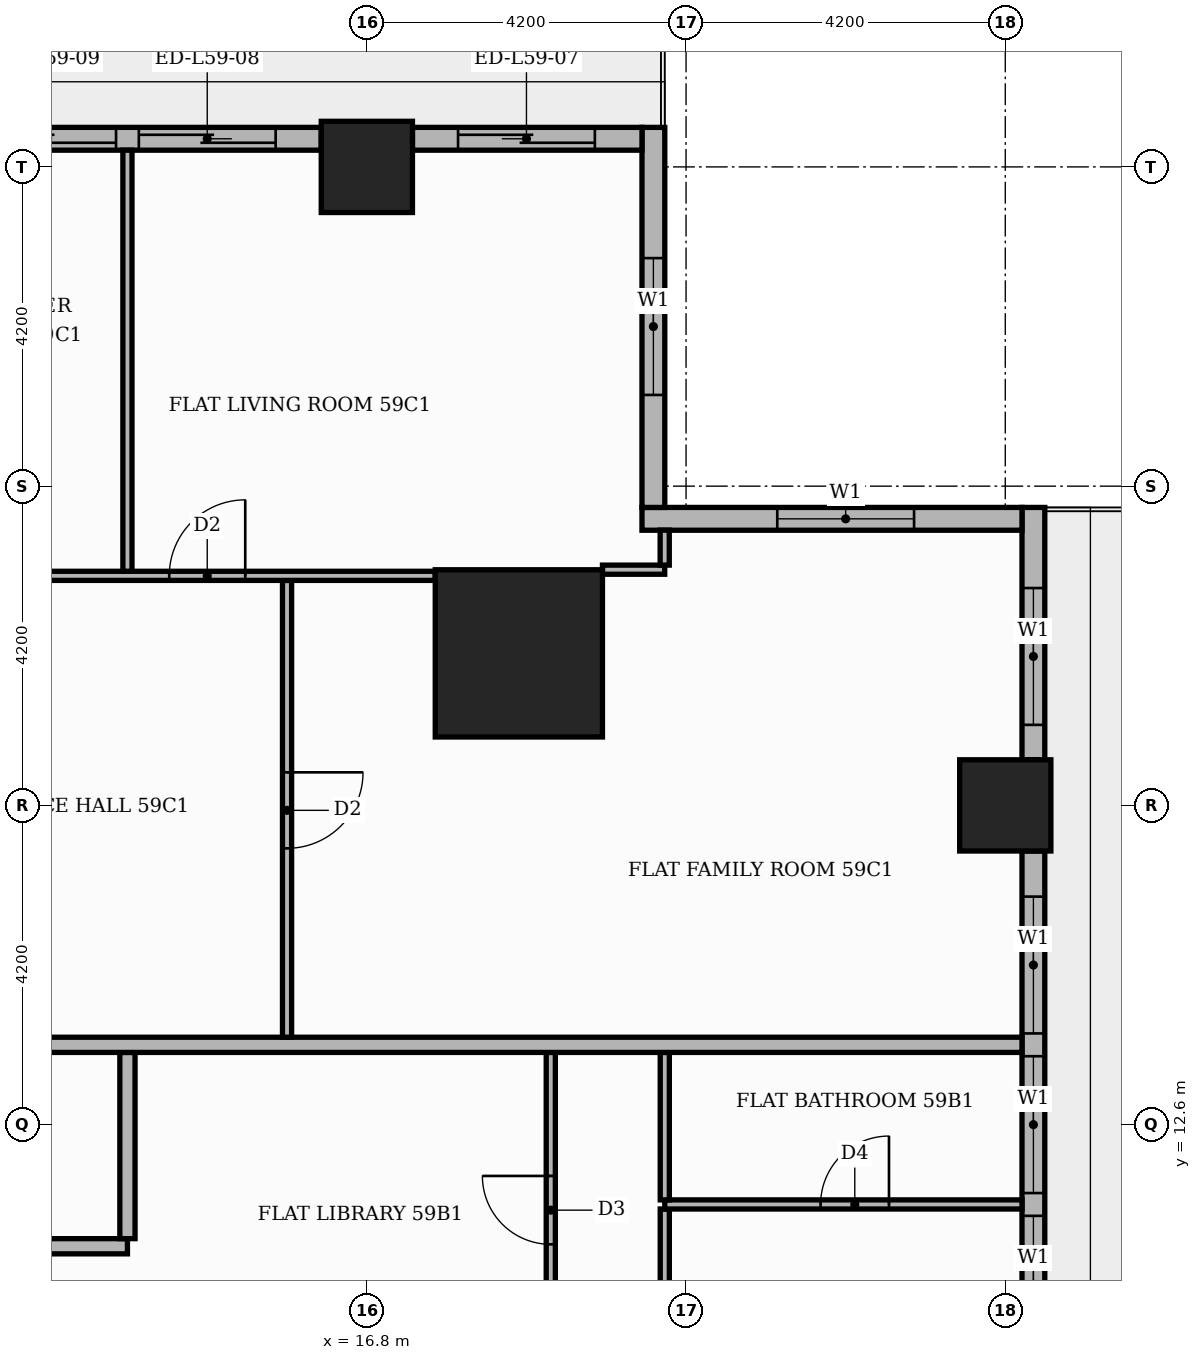
"""IFC4 building model, lengths in metres.
Left out: names, types, materials, properties, quantities, classifications, styles, units other than length and angle.
Written with IfcOpenShell. Run it as: python <this file> out.ifc"""

import sys

from ifc_helpers import new_model, si_unit, direction, frame, frame_2d, origin, origin_2d, place, context, subcontext, project, spatial, rectangle, extrude, element, fill, save


model = new_model("IFC4")
c1 = context("Model", 3, precision=1e-05, world=origin(), true_north=direction((0.0, 1.0)))
c2 = subcontext(c1, "Body", "Model", "MODEL_VIEW")
j1 = project(units=[si_unit("LENGTHUNIT", "METRE"), si_unit("PLANEANGLEUNIT", "RADIAN")], contexts=[c1])
p1 = place(None, origin())
s1 = spatial("IfcSite", under=j1, at=p1, CompositionType="ELEMENT")
p2 = place(p1, origin())
s2 = spatial("IfcBuilding", under=s1, at=p2, CompositionType="ELEMENT")
p3 = place(p2, frame((0.0, 0.0, 248.4)))
s3 = spatial("IfcBuildingStorey", under=s2, at=p3, CompositionType="ELEMENT", Elevation=248.4)
p4 = place(p3, frame((18.8, 18.8, 0.0), z_axis=(0.0, 0.0, 1.0), x_axis=(1.0, 0.0, 0.0)))
e1 = element("IfcColumn", 1, at=p4, inside=s3, PredefinedType="COLUMN", context=c2, shape_type="SweptSolid", body=[
    extrude(rectangle(XDim=2.2, YDim=2.2, at=origin_2d()), origin(), (0.0, 0.0, 1.0), 3.9),
])
for number, where, z_axis, x_axis in (
    (2, (25.2, 16.8, 0.0), (0.0, 0.0, 1.0), (1.0, 0.0, 0.0)),
    (3, (16.8, 25.2, 0.0), (0.0, 0.0, 1.0), (1.0, 0.0, 0.0)),
):
    element("IfcColumn", number, at=place(p3, frame(where, z_axis=z_axis, x_axis=x_axis)), inside=s3, PredefinedType="COLUMN", context=c2, shape_type="SweptSolid", body=[
        extrude(rectangle(XDim=1.2, YDim=1.2, at=origin_2d()), origin(), (0.0, 0.0, 1.0), 3.9),
    ])
p5 = place(p3, frame((25.57, 9.0, 0.0), z_axis=(0.0, 0.0, 1.0), x_axis=(0.0, 1.0, 0.0)))
e4 = element("IfcWall", 4, at=p5, inside=s3, PredefinedType="STANDARD", context=c2, shape_type="SweptSolid", body=[
    extrude(rectangle(XDim=7.2, YDim=0.3, at=frame_2d((3.6, 0.0))), origin(), (0.0, 0.0, 1.0), 3.48),
])
p6 = place(p5, frame((0.6, 0.0, 0.9)))
e5 = element("IfcOpeningElement", 5, at=p6, cuts=e4, PredefinedType="OPENING", context=c2, shape_type="SweptSolid", body=[
    extrude(rectangle(XDim=1.8, YDim=2.1, at=frame_2d((0.9, 1.05))), frame((0.0, 0.16, 0.0), z_axis=(0.0, -1.0, 0.0), x_axis=(1.0, 0.0, 0.0)), (0.0, 0.0, 1.0), 0.32),
])
p7 = place(p5, frame((2.7, 0.0, 0.9)))
e6 = element("IfcOpeningElement", 6, at=p7, cuts=e4, PredefinedType="OPENING", context=c2, shape_type="SweptSolid", body=[
    extrude(rectangle(XDim=1.8, YDim=2.1, at=frame_2d((0.9, 1.05))), frame((0.0, 0.16, 0.0), z_axis=(0.0, -1.0, 0.0), x_axis=(1.0, 0.0, 0.0)), (0.0, 0.0, 1.0), 0.32),
])
p8 = place(p5, frame((4.8, 0.0, 0.9)))
e7 = element("IfcOpeningElement", 7, at=p8, cuts=e4, PredefinedType="OPENING", context=c2, shape_type="SweptSolid", body=[
    extrude(rectangle(XDim=1.8, YDim=2.1, at=frame_2d((0.9, 1.05))), frame((0.0, 0.16, 0.0), z_axis=(0.0, -1.0, 0.0), x_axis=(1.0, 0.0, 0.0)), (0.0, 0.0, 1.0), 0.32),
])
p9 = place(p3, frame((25.57, 17.4, 0.0), z_axis=(0.0, 0.0, 1.0), x_axis=(0.0, 1.0, 0.0)))
e8 = element("IfcWall", 8, at=p9, inside=s3, PredefinedType="STANDARD", context=c2, shape_type="SweptSolid", body=[
    extrude(rectangle(XDim=3.32, YDim=0.3, at=frame_2d((1.66, 0.0))), origin(), (0.0, 0.0, 1.0), 3.48),
])
p10 = place(p9, frame((0.459, 0.0, 0.9)))
e9 = element("IfcOpeningElement", 9, at=p10, cuts=e8, PredefinedType="OPENING", context=c2, shape_type="SweptSolid", body=[
    extrude(rectangle(XDim=1.8, YDim=2.1, at=frame_2d((0.9, 1.05))), frame((0.0, 0.16, 0.0), z_axis=(0.0, -1.0, 0.0), x_axis=(1.0, 0.0, 0.0)), (0.0, 0.0, 1.0), 0.32),
])
p11 = place(p3, frame((25.42, 20.57, 0.0), z_axis=(0.0, 0.0, 1.0), x_axis=(-1.0, 0.0, 0.0)))
e10 = element("IfcWall", 10, at=p11, inside=s3, PredefinedType="STANDARD", context=c2, shape_type="SweptSolid", body=[
    extrude(rectangle(XDim=5.0, YDim=0.3, at=frame_2d((2.5, 0.0))), origin(), (0.0, 0.0, 1.0), 3.48),
])
p12 = place(p11, frame((1.42, 0.0, 0.9)))
e11 = element("IfcOpeningElement", 11, at=p12, cuts=e10, PredefinedType="OPENING", context=c2, shape_type="SweptSolid", body=[
    extrude(rectangle(XDim=1.8, YDim=2.1, at=frame_2d((0.9, 1.05))), frame((0.0, 0.16, 0.0), z_axis=(0.0, -1.0, 0.0), x_axis=(1.0, 0.0, 0.0)), (0.0, 0.0, 1.0), 0.32),
])
p13 = place(p3, frame((20.57, 20.72, 0.0), z_axis=(0.0, 0.0, 1.0), x_axis=(0.0, 1.0, 0.0)))
e12 = element("IfcWall", 12, at=p13, inside=s3, PredefinedType="STANDARD", context=c2, shape_type="SweptSolid", body=[
    extrude(rectangle(XDim=5.0, YDim=0.3, at=frame_2d((2.5, 0.0))), origin(), (0.0, 0.0, 1.0), 3.48),
])
p14 = place(p13, frame((1.48, 0.0, 0.9)))
e13 = element("IfcOpeningElement", 13, at=p14, cuts=e12, PredefinedType="OPENING", context=c2, shape_type="SweptSolid", body=[
    extrude(rectangle(XDim=1.8, YDim=2.1, at=frame_2d((0.9, 1.05))), frame((0.0, 0.16, 0.0), z_axis=(0.0, -1.0, 0.0), x_axis=(1.0, 0.0, 0.0)), (0.0, 0.0, 1.0), 0.32),
])
p15 = place(p3, frame((20.42, 25.57, 0.0), z_axis=(0.0, 0.0, 1.0), x_axis=(-1.0, 0.0, 0.0)))
e14 = element("IfcWall", 14, at=p15, inside=s3, PredefinedType="STANDARD", context=c2, shape_type="SweptSolid", body=[
    extrude(rectangle(XDim=3.02, YDim=0.3, at=frame_2d((1.51, 0.0))), origin(), (0.0, 0.0, 1.0), 3.48),
])
p16 = place(p15, frame((0.62, 0.0, 0.0)))
e15 = element("IfcOpeningElement", 15, at=p16, cuts=e14, PredefinedType="OPENING", context=c2, shape_type="SweptSolid", body=[
    extrude(rectangle(XDim=1.8, YDim=2.4, at=frame_2d((0.9, 1.2))), frame((0.0, 0.16, 0.0), z_axis=(0.0, -1.0, 0.0), x_axis=(1.0, 0.0, 0.0)), (0.0, 0.0, 1.0), 0.32),
])
p17 = place(p3, frame((16.2, 25.57, 0.0), z_axis=(0.0, 0.0, 1.0), x_axis=(-1.0, 0.0, 0.0)))
e16 = element("IfcWall", 16, at=p17, inside=s3, PredefinedType="STANDARD", context=c2, shape_type="SweptSolid", body=[
    extrude(rectangle(XDim=7.2, YDim=0.3, at=frame_2d((3.6, 0.0))), origin(), (0.0, 0.0, 1.0), 3.48),
])
p18 = place(p17, frame((0.6, 0.0, 0.0)))
e17 = element("IfcOpeningElement", 17, at=p18, cuts=e16, PredefinedType="OPENING", context=c2, shape_type="SweptSolid", body=[
    extrude(rectangle(XDim=1.8, YDim=2.4, at=frame_2d((0.9, 1.2))), frame((0.0, 0.16, 0.0), z_axis=(0.0, -1.0, 0.0), x_axis=(1.0, 0.0, 0.0)), (0.0, 0.0, 1.0), 0.32),
])
p19 = place(p17, frame((2.7, 0.0, 0.0)))
e18 = element("IfcOpeningElement", 18, at=p19, cuts=e16, PredefinedType="OPENING", context=c2, shape_type="SweptSolid", body=[
    extrude(rectangle(XDim=1.8, YDim=2.4, at=frame_2d((0.9, 1.2))), frame((0.0, 0.16, 0.0), z_axis=(0.0, -1.0, 0.0), x_axis=(1.0, 0.0, 0.0)), (0.0, 0.0, 1.0), 0.32),
])
p20 = place(p17, frame((4.8, 0.0, 0.9)))
e19 = element("IfcOpeningElement", 19, at=p20, cuts=e16, PredefinedType="OPENING", context=c2, shape_type="SweptSolid", body=[
    extrude(rectangle(XDim=1.8, YDim=2.1, at=frame_2d((0.9, 1.05))), frame((0.0, 0.16, 0.0), z_axis=(0.0, -1.0, 0.0), x_axis=(1.0, 0.0, 0.0)), (0.0, 0.0, 1.0), 0.32),
])
p21 = place(p3, frame((20.72, 7.41, 0.0), z_axis=(0.0, 0.0, 1.0), x_axis=(0.0, 1.0, 0.0)))
e20 = element("IfcWall", 20, at=p21, inside=s3, PredefinedType="PARTITIONING", context=c2, shape_type="SweptSolid", body=[
    extrude(rectangle(XDim=4.08, YDim=0.12, at=frame_2d((2.04, 0.0))), origin(), (0.0, 0.0, 1.0), 3.48),
])
p22 = place(p21, frame((1.59, 0.0, 0.0)))
e21 = element("IfcOpeningElement", 21, at=p22, cuts=e20, PredefinedType="OPENING", context=c2, shape_type="SweptSolid", body=[
    extrude(rectangle(XDim=0.9, YDim=2.1, at=frame_2d((0.45, 1.05))), frame((0.0, 0.07, 0.0), z_axis=(0.0, -1.0, 0.0), x_axis=(1.0, 0.0, 0.0)), (0.0, 0.0, 1.0), 0.14),
])
p23 = place(p3, frame((19.22, 9.36, 0.0), z_axis=(0.0, 0.0, 1.0), x_axis=(0.0, 1.0, 0.0)))
e22 = element("IfcWall", 22, at=p23, inside=s3, PredefinedType="PARTITIONING", context=c2, shape_type="SweptSolid", body=[
    extrude(rectangle(XDim=4.19, YDim=0.12, at=frame_2d((2.095, 0.0))), origin(), (0.0, 0.0, 1.0), 3.48),
])
p24 = place(p23, frame((1.665, 0.0, 0.0)))
e23 = element("IfcOpeningElement", 23, at=p24, cuts=e22, PredefinedType="OPENING", context=c2, shape_type="SweptSolid", body=[
    extrude(rectangle(XDim=0.9, YDim=2.1, at=frame_2d((0.45, 1.05))), frame((0.0, 0.07, 0.0), z_axis=(0.0, -1.0, 0.0), x_axis=(1.0, 0.0, 0.0)), (0.0, 0.0, 1.0), 0.14),
])
p25 = place(p3, frame((11.0, 11.0, 0.0), z_axis=(0.0, 0.0, 1.0), x_axis=(1.0, 0.0, 0.0)))
e24 = element("IfcWall", 24, at=p25, inside=s3, PredefinedType="PARTITIONING", context=c2, shape_type="SweptSolid", body=[
    extrude(rectangle(XDim=2.65, YDim=0.2, at=frame_2d((1.325, 0.0))), origin(), (0.0, 0.0, 1.0), 3.48),
])
p26 = place(p3, frame((13.65, 11.1, 0.0), z_axis=(0.0, 0.0, 1.0), x_axis=(0.0, 1.0, 0.0)))
e25 = element("IfcWall", 25, at=p26, inside=s3, PredefinedType="PARTITIONING", context=c2, shape_type="SweptSolid", body=[
    extrude(rectangle(XDim=2.45, YDim=0.2, at=frame_2d((1.225, 0.0))), origin(), (0.0, 0.0, 1.0), 3.48),
])
p27 = place(p3, frame((20.72, 11.55, 0.0), z_axis=(0.0, 0.0, 1.0), x_axis=(1.0, 0.0, 0.0)))
e26 = element("IfcWall", 26, at=p27, inside=s3, PredefinedType="PARTITIONING", context=c2, shape_type="SweptSolid", body=[
    extrude(rectangle(XDim=4.7, YDim=0.12, at=frame_2d((2.35, 0.0))), origin(), (0.0, 0.0, 1.0), 3.48),
])
p28 = place(p27, frame((2.05, 0.0, 0.0)))
e27 = element("IfcOpeningElement", 27, at=p28, cuts=e26, PredefinedType="OPENING", context=c2, shape_type="SweptSolid", body=[
    extrude(rectangle(XDim=0.9, YDim=2.1, at=frame_2d((0.45, 1.05))), frame((0.0, 0.07, 0.0), z_axis=(0.0, -1.0, 0.0), x_axis=(1.0, 0.0, 0.0)), (0.0, 0.0, 1.0), 0.14),
])
p29 = place(p3, frame((20.72, 11.61, 0.0), z_axis=(0.0, 0.0, 1.0), x_axis=(0.0, 1.0, 0.0)))
e28 = element("IfcWall", 28, at=p29, inside=s3, PredefinedType="PARTITIONING", context=c2, shape_type="SweptSolid", body=[
    extrude(rectangle(XDim=1.94, YDim=0.12, at=frame_2d((0.97, 0.0))), origin(), (0.0, 0.0, 1.0), 3.48),
])
p30 = place(p3, frame((-13.65, 13.65, 0.0), z_axis=(0.0, 0.0, 1.0), x_axis=(1.0, 0.0, 0.0)))
e29 = element("IfcWall", 29, at=p30, inside=s3, PredefinedType="PARTITIONING", context=c2, shape_type="SweptSolid", body=[
    extrude(rectangle(XDim=39.07, YDim=0.2, at=frame_2d((19.535, 0.0))), origin(), (0.0, 0.0, 1.0), 3.48),
])
p31 = place(p30, frame((24.65, 0.0, 0.0)))
e30 = element("IfcOpeningElement", 30, at=p31, cuts=e29, PredefinedType="OPENING", context=c2, shape_type="SweptSolid", body=[
    extrude(rectangle(XDim=1.1, YDim=2.4, at=frame_2d((0.55, 1.2))), frame((0.0, 0.11, 0.0), z_axis=(0.0, -1.0, 0.0), x_axis=(1.0, 0.0, 0.0)), (0.0, 0.0, 1.0), 0.22),
])
p32 = place(p30, frame((12.05, 0.0, 0.0)))
e31 = element("IfcOpeningElement", 31, at=p32, cuts=e29, PredefinedType="OPENING", context=c2, shape_type="SweptSolid", body=[
    extrude(rectangle(XDim=1.1, YDim=2.4, at=frame_2d((0.55, 1.2))), frame((0.0, 0.11, 0.0), z_axis=(0.0, -1.0, 0.0), x_axis=(1.0, 0.0, 0.0)), (0.0, 0.0, 1.0), 0.22),
])
p33 = place(p3, frame((15.75, 13.75, 0.0), z_axis=(0.0, 0.0, 1.0), x_axis=(0.0, 1.0, 0.0)))
e32 = element("IfcWall", 32, at=p33, inside=s3, PredefinedType="PARTITIONING", context=c2, shape_type="SweptSolid", body=[
    extrude(rectangle(XDim=6.01, YDim=0.12, at=frame_2d((3.005, 0.0))), origin(), (0.0, 0.0, 1.0), 3.48),
])
p34 = place(p33, frame((2.485, 0.0, 0.0)))
e33 = element("IfcOpeningElement", 33, at=p34, cuts=e32, PredefinedType="OPENING", context=c2, shape_type="SweptSolid", body=[
    extrude(rectangle(XDim=1.0, YDim=2.1, at=frame_2d((0.5, 1.05))), frame((0.0, 0.07, 0.0), z_axis=(0.0, -1.0, 0.0), x_axis=(1.0, 0.0, 0.0)), (0.0, 0.0, 1.0), 0.14),
])
p35 = place(p3, frame((5.35, 19.82, 0.0), z_axis=(0.0, 0.0, 1.0), x_axis=(1.0, 0.0, 0.0)))
e34 = element("IfcWall", 34, at=p35, inside=s3, PredefinedType="PARTITIONING", context=c2, shape_type="SweptSolid", body=[
    extrude(rectangle(XDim=12.35, YDim=0.12, at=frame_2d((6.175, 0.0))), origin(), (0.0, 0.0, 1.0), 3.48),
])
p36 = place(p35, frame((8.85, 0.0, 0.0)))
e35 = element("IfcOpeningElement", 35, at=p36, cuts=e34, PredefinedType="OPENING", context=c2, shape_type="SweptSolid", body=[
    extrude(rectangle(XDim=1.0, YDim=2.1, at=frame_2d((0.5, 1.05))), frame((0.0, 0.07, 0.0), z_axis=(0.0, -1.0, 0.0), x_axis=(1.0, 0.0, 0.0)), (0.0, 0.0, 1.0), 0.14),
])
p37 = place(p35, frame((5.75, 0.0, 0.0)))
e36 = element("IfcOpeningElement", 36, at=p37, cuts=e34, PredefinedType="OPENING", context=c2, shape_type="SweptSolid", body=[
    extrude(rectangle(XDim=0.9, YDim=2.1, at=frame_2d((0.45, 1.05))), frame((0.0, 0.07, 0.0), z_axis=(0.0, -1.0, 0.0), x_axis=(1.0, 0.0, 0.0)), (0.0, 0.0, 1.0), 0.14),
])
p38 = place(p3, frame((13.65, 19.88, 0.0), z_axis=(0.0, 0.0, 1.0), x_axis=(0.0, 1.0, 0.0)))
e37 = element("IfcWall", 37, at=p38, inside=s3, PredefinedType="PARTITIONING", context=c2, shape_type="SweptSolid", body=[
    extrude(rectangle(XDim=5.54, YDim=0.12, at=frame_2d((2.77, 0.0))), origin(), (0.0, 0.0, 1.0), 3.48),
])
p39 = place(p3, frame((19.9, 19.901, 0.0), z_axis=(0.0, 0.0, 1.0), x_axis=(1.0, 0.0, 0.0)))
e38 = element("IfcWall", 38, at=p39, inside=s3, PredefinedType="PARTITIONING", context=c2, shape_type="SweptSolid", body=[
    extrude(rectangle(XDim=0.819, YDim=0.12, at=frame_2d((0.41, 0.0))), origin(), (0.0, 0.0, 1.0), 3.48),
])
p40 = place(p3, frame((20.719, 19.961, 0.0), z_axis=(0.0, 0.0, 1.0), x_axis=(0.0, 1.0, 0.0)))
e39 = element("IfcWall", 39, at=p40, inside=s3, PredefinedType="PARTITIONING", context=c2, shape_type="SweptSolid", body=[
    extrude(rectangle(XDim=0.46, YDim=0.12, at=frame_2d((0.23, 0.0))), origin(), (0.0, 0.0, 1.0), 3.48),
])
p41 = place(p6, origin())
e40 = element("IfcWindow", 40, at=p41, inside=s3, PartitioningType="SINGLE_PANEL", PredefinedType="WINDOW", context=c2, shape_type="SweptSolid", body=[
    extrude(rectangle(XDim=1.8, YDim=2.1, at=frame_2d((0.9, 1.05))), frame((0.0, 0.03, 0.0), z_axis=(0.0, -1.0, 0.0), x_axis=(1.0, 0.0, 0.0)), (0.0, 0.0, 1.0), 0.06),
])
fill(e5, e40)
p42 = place(p7, origin())
e41 = element("IfcWindow", 41, at=p42, inside=s3, PartitioningType="SINGLE_PANEL", PredefinedType="WINDOW", context=c2, shape_type="SweptSolid", body=[
    extrude(rectangle(XDim=1.8, YDim=2.1, at=frame_2d((0.9, 1.05))), frame((0.0, 0.03, 0.0), z_axis=(0.0, -1.0, 0.0), x_axis=(1.0, 0.0, 0.0)), (0.0, 0.0, 1.0), 0.06),
])
fill(e6, e41)
p43 = place(p8, origin())
e42 = element("IfcWindow", 42, at=p43, inside=s3, PartitioningType="SINGLE_PANEL", PredefinedType="WINDOW", context=c2, shape_type="SweptSolid", body=[
    extrude(rectangle(XDim=1.8, YDim=2.1, at=frame_2d((0.9, 1.05))), frame((0.0, 0.03, 0.0), z_axis=(0.0, -1.0, 0.0), x_axis=(1.0, 0.0, 0.0)), (0.0, 0.0, 1.0), 0.06),
])
fill(e7, e42)
p44 = place(p10, origin())
e43 = element("IfcWindow", 43, at=p44, inside=s3, PartitioningType="SINGLE_PANEL", PredefinedType="WINDOW", context=c2, shape_type="SweptSolid", body=[
    extrude(rectangle(XDim=1.8, YDim=2.1, at=frame_2d((0.9, 1.05))), frame((0.0, 0.03, 0.0), z_axis=(0.0, -1.0, 0.0), x_axis=(1.0, 0.0, 0.0)), (0.0, 0.0, 1.0), 0.06),
])
fill(e9, e43)
p45 = place(p12, origin())
e44 = element("IfcWindow", 44, at=p45, inside=s3, PartitioningType="SINGLE_PANEL", PredefinedType="WINDOW", context=c2, shape_type="SweptSolid", body=[
    extrude(rectangle(XDim=1.8, YDim=2.1, at=frame_2d((0.9, 1.05))), frame((0.0, 0.03, 0.0), z_axis=(0.0, -1.0, 0.0), x_axis=(1.0, 0.0, 0.0)), (0.0, 0.0, 1.0), 0.06),
])
fill(e11, e44)
p46 = place(p14, origin())
e45 = element("IfcWindow", 45, at=p46, inside=s3, PartitioningType="SINGLE_PANEL", PredefinedType="WINDOW", context=c2, shape_type="SweptSolid", body=[
    extrude(rectangle(XDim=1.8, YDim=2.1, at=frame_2d((0.9, 1.05))), frame((0.0, 0.03, 0.0), z_axis=(0.0, -1.0, 0.0), x_axis=(1.0, 0.0, 0.0)), (0.0, 0.0, 1.0), 0.06),
])
fill(e13, e45)
p47 = place(p16, origin())
e46 = element("IfcDoor", 46, at=p47, inside=s3, OperationType="SLIDING_TO_RIGHT", PredefinedType="DOOR", context=c2, shape_type="SweptSolid", body=[
    extrude(rectangle(XDim=1.8, YDim=2.4, at=frame_2d((0.9, 1.2))), frame((0.0, 0.025, 0.0), z_axis=(0.0, -1.0, 0.0), x_axis=(1.0, 0.0, 0.0)), (0.0, 0.0, 1.0), 0.05),
])
fill(e15, e46)
p48 = place(p18, origin())
e47 = element("IfcDoor", 47, at=p48, inside=s3, OperationType="SLIDING_TO_LEFT", PredefinedType="DOOR", context=c2, shape_type="SweptSolid", body=[
    extrude(rectangle(XDim=1.8, YDim=2.4, at=frame_2d((0.9, 1.2))), frame((0.0, 0.025, 0.0), z_axis=(0.0, -1.0, 0.0), x_axis=(1.0, 0.0, 0.0)), (0.0, 0.0, 1.0), 0.05),
])
fill(e17, e47)
p49 = place(p19, origin())
e48 = element("IfcDoor", 48, at=p49, inside=s3, OperationType="SLIDING_TO_RIGHT", PredefinedType="DOOR", context=c2, shape_type="SweptSolid", body=[
    extrude(rectangle(XDim=1.8, YDim=2.4, at=frame_2d((0.9, 1.2))), frame((0.0, 0.025, 0.0), z_axis=(0.0, -1.0, 0.0), x_axis=(1.0, 0.0, 0.0)), (0.0, 0.0, 1.0), 0.05),
])
fill(e18, e48)
p50 = place(p24, origin())
e49 = element("IfcDoor", 49, at=p50, inside=s3, OperationType="SINGLE_SWING_RIGHT", PredefinedType="DOOR", context=c2, shape_type="SweptSolid", body=[
    extrude(rectangle(XDim=0.9, YDim=2.1, at=frame_2d((0.45, 1.05))), frame((0.0, 0.025, 0.0), z_axis=(0.0, -1.0, 0.0), x_axis=(1.0, 0.0, 0.0)), (0.0, 0.0, 1.0), 0.05),
])
fill(e23, e49)
p51 = place(p28, origin())
e50 = element("IfcDoor", 50, at=p51, inside=s3, OperationType="SINGLE_SWING_RIGHT", PredefinedType="DOOR", context=c2, shape_type="SweptSolid", body=[
    extrude(rectangle(XDim=0.9, YDim=2.1, at=frame_2d((0.45, 1.05))), frame((0.0, 0.025, 0.0), z_axis=(0.0, -1.0, 0.0), x_axis=(1.0, 0.0, 0.0)), (0.0, 0.0, 1.0), 0.05),
])
fill(e27, e50)
p52 = place(p34, frame((1.0, 0.0, 0.0), z_axis=(0.0, 0.0, 1.0), x_axis=(-1.0, 0.0, 0.0)))
e51 = element("IfcDoor", 51, at=p52, inside=s3, OperationType="SINGLE_SWING_RIGHT", PredefinedType="DOOR", context=c2, shape_type="SweptSolid", body=[
    extrude(rectangle(XDim=1.0, YDim=2.1, at=frame_2d((0.5, 1.05))), frame((0.0, 0.025, 0.0), z_axis=(0.0, -1.0, 0.0), x_axis=(1.0, 0.0, 0.0)), (0.0, 0.0, 1.0), 0.05),
])
fill(e33, e51)
p53 = place(p36, origin())
e52 = element("IfcDoor", 52, at=p53, inside=s3, OperationType="SINGLE_SWING_RIGHT", PredefinedType="DOOR", context=c2, shape_type="SweptSolid", body=[
    extrude(rectangle(XDim=1.0, YDim=2.1, at=frame_2d((0.5, 1.05))), frame((0.0, 0.025, 0.0), z_axis=(0.0, -1.0, 0.0), x_axis=(1.0, 0.0, 0.0)), (0.0, 0.0, 1.0), 0.05),
])
fill(e35, e52)
save(model, sys.argv[1])
